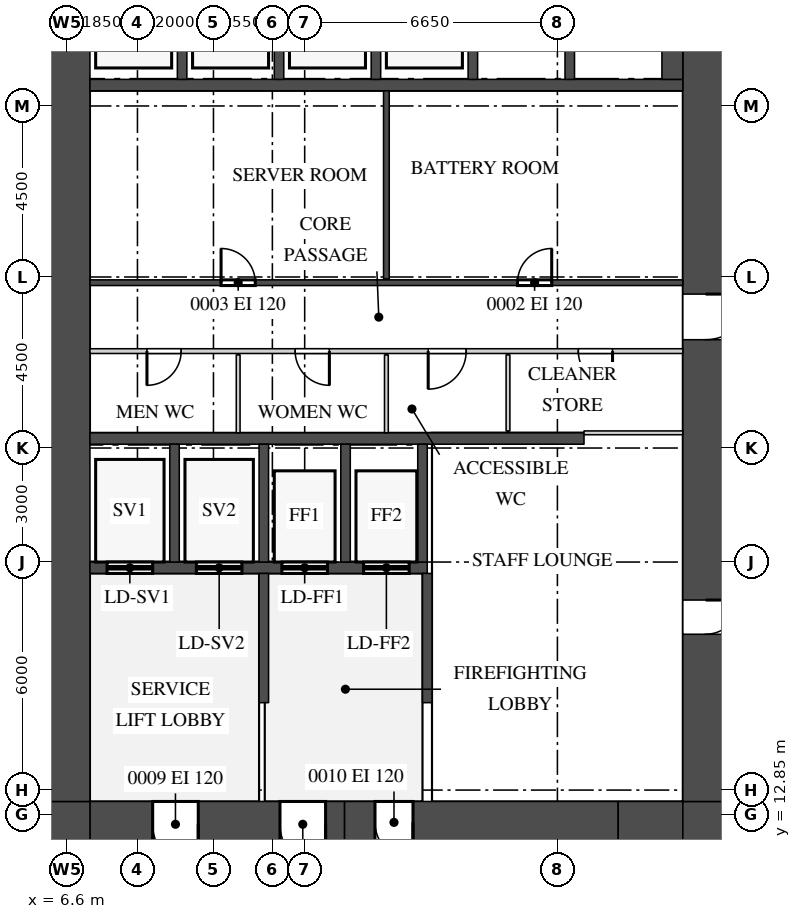
"""IFC4 building model, lengths in metres.
Left out: names, types, materials, properties, quantities, classifications, styles, units other than length and angle.
Written with IfcOpenShell. Run it as: python <this file> out.ifc"""

import sys

from ifc_helpers import new_model, si_unit, direction, frame, frame_2d, origin, place, context, subcontext, project, spatial, rectangle, extrude, source, transform, mapped, element, fill, save


model = new_model("IFC4")
c1 = context("Model", 3, precision=1e-05, world=origin(), true_north=direction((0.0, 1.0)))
c2 = subcontext(c1, "Body", "Model", "MODEL_VIEW")
j1 = project(units=[si_unit("LENGTHUNIT", "METRE"), si_unit("PLANEANGLEUNIT", "RADIAN")], contexts=[c1])
p1 = place(None, origin())
s1 = spatial("IfcSite", under=j1, at=p1, CompositionType="ELEMENT")
p2 = place(p1, origin())
s2 = spatial("IfcBuilding", under=s1, at=p2, CompositionType="ELEMENT")
p3 = place(p2, frame((0.0, 0.0, 60.0)))
s3 = spatial("IfcBuildingStorey", under=s2, at=p3, CompositionType="ELEMENT", Elevation=60.0)
m1 = source(origin(), c2, "Body", "SweptSolid", [
    extrude(rectangle(XDim=6.7, YDim=1.2, at=frame_2d((3.35, 0.0))), origin(), (0.0, 0.0, 1.0), 4.2),
])
p4 = place(p3, frame((7.2, 12.6, 0.0), z_axis=(0.0, 0.0, 1.0), x_axis=(1.0, 0.0, 0.0)))
e1 = element("IfcWall", 1, at=p4, inside=s3, PredefinedType="SHEAR", context=c2, shape_type="MappedRepresentation", body=[
    mapped(m1, transform((0.0, 0.0, 0.0))),
])
m2 = source(origin(), c2, "Body", "SweptSolid", [
    extrude(rectangle(XDim=1.2, YDim=2.1, at=frame_2d((0.6, 1.05))), frame((0.0, 0.61, 0.0), z_axis=(0.0, -1.0, 0.0), x_axis=(1.0, 0.0, 0.0)), (0.0, 0.0, 1.0), 1.22),
])
p5 = place(p4, frame((5.0, 0.0, 0.0)))
e2 = element("IfcOpeningElement", 2, at=p5, cuts=e1, PredefinedType="OPENING", context=c2, shape_type="MappedRepresentation", body=[
    mapped(m2, transform((0.0, 0.0, 0.0))),
])
p6 = place(p4, frame((1.65, 0.0, 0.0)))
e3 = element("IfcOpeningElement", 3, at=p6, cuts=e1, PredefinedType="OPENING", context=c2, shape_type="MappedRepresentation", body=[
    mapped(m2, transform((0.0, 0.0, 0.0))),
])
m3 = source(origin(), c2, "Body", "SweptSolid", [
    extrude(rectangle(XDim=7.2, YDim=1.1, at=frame_2d((3.6, 0.0))), origin(), (0.0, 0.0, 1.0), 4.2),
])
p7 = place(p3, frame((13.9, 12.65, 0.0), z_axis=(0.0, 0.0, 1.0), x_axis=(1.0, 0.0, 0.0)))
e4 = element("IfcWall", 4, at=p7, inside=s3, PredefinedType="SHEAR", context=c2, shape_type="MappedRepresentation", body=[
    mapped(m3, transform((0.0, 0.0, 0.0))),
])
m4 = source(origin(), c2, "Body", "SweptSolid", [
    extrude(rectangle(XDim=1.0, YDim=2.1, at=frame_2d((0.5, 1.05))), frame((0.0, 0.56, 0.0), z_axis=(0.0, -1.0, 0.0), x_axis=(1.0, 0.0, 0.0)), (0.0, 0.0, 1.0), 1.12),
])
p8 = place(p7, frame((0.8, 0.0, 0.0)))
e5 = element("IfcOpeningElement", 5, at=p8, cuts=e4, PredefinedType="OPENING", context=c2, shape_type="MappedRepresentation", body=[
    mapped(m4, transform((0.0, 0.0, 0.0))),
])
m5 = source(origin(), c2, "Body", "SweptSolid", [
    extrude(rectangle(XDim=1.7, YDim=1.2, at=frame_2d((0.85, 0.0))), origin(), (0.0, 0.0, 1.0), 4.2),
])
p9 = place(p3, frame((21.1, 12.6, 0.0), z_axis=(0.0, 0.0, 1.0), x_axis=(1.0, 0.0, 0.0)))
e6 = element("IfcWall", 6, at=p9, inside=s3, PredefinedType="SHEAR", context=c2, shape_type="MappedRepresentation", body=[
    mapped(m5, transform((0.0, 0.0, 0.0))),
])
m6 = source(origin(), c2, "Body", "SweptSolid", [
    extrude(rectangle(XDim=1.2, YDim=1.2, at=frame_2d((0.6, 0.0))), origin(), (0.0, 0.0, 1.0), 4.2),
])
for number, where, z_axis, x_axis in (
    (7, (22.8, 12.6, 0.0), (0.0, 0.0, 1.0), (1.0, 0.0, 0.0)),
    (8, (6.0, 12.6, 0.0), (0.0, 0.0, 1.0), (1.0, 0.0, 0.0)),
):
    element("IfcWall", number, at=place(p3, frame(where, z_axis=z_axis, x_axis=x_axis)), inside=s3, PredefinedType="SHEAR", context=c2, shape_type="MappedRepresentation", body=[
        mapped(m6, transform((0.0, 0.0, 0.0))),
    ])
m7 = source(origin(), c2, "Body", "SweptSolid", [
    extrude(rectangle(XDim=27.6, YDim=1.2, at=frame_2d((13.8, 0.0))), origin(), (0.0, 0.0, 1.0), 4.2),
])
p10 = place(p3, frame((23.4, 13.2, 0.0), z_axis=(0.0, 0.0, 1.0), x_axis=(0.0, 1.0, 0.0)))
e9 = element("IfcWall", 9, at=p10, inside=s3, PredefinedType="SHEAR", context=c2, shape_type="MappedRepresentation", body=[
    mapped(m7, transform((0.0, 0.0, 0.0))),
])
m8 = source(origin(), c2, "Body", "SweptSolid", [
    extrude(rectangle(XDim=1.8, YDim=2.1, at=frame_2d((0.9, 1.05))), frame((0.0, 0.61, 0.0), z_axis=(0.0, -1.0, 0.0), x_axis=(1.0, 0.0, 0.0)), (0.0, 0.0, 1.0), 1.22),
])
p11 = place(p10, frame((22.4, 0.0, 0.0)))
e10 = element("IfcOpeningElement", 10, at=p11, cuts=e9, PredefinedType="OPENING", context=c2, shape_type="MappedRepresentation", body=[
    mapped(m8, transform((0.0, 0.0, 0.0))),
])
p12 = place(p10, frame((12.15, 0.0, 0.0)))
e11 = element("IfcOpeningElement", 11, at=p12, cuts=e9, PredefinedType="OPENING", context=c2, shape_type="MappedRepresentation", body=[
    mapped(m2, transform((0.0, 0.0, 0.0))),
])
m9 = source(origin(), c2, "Body", "SweptSolid", [
    extrude(rectangle(XDim=0.9, YDim=2.1, at=frame_2d((0.45, 1.05))), frame((0.0, 0.61, 0.0), z_axis=(0.0, -1.0, 0.0), x_axis=(1.0, 0.0, 0.0)), (0.0, 0.0, 1.0), 1.22),
])
p13 = place(p10, frame((4.4, 0.0, 0.0)))
e12 = element("IfcOpeningElement", 12, at=p13, cuts=e9, PredefinedType="OPENING", context=c2, shape_type="MappedRepresentation", body=[
    mapped(m9, transform((0.0, 0.0, 0.0))),
])
p14 = place(p3, frame((6.6, 13.2, 0.0), z_axis=(0.0, 0.0, 1.0), x_axis=(0.0, 1.0, 0.0)))
e13 = element("IfcWall", 13, at=p14, inside=s3, PredefinedType="SHEAR", context=c2, shape_type="MappedRepresentation", body=[
    mapped(m7, transform((0.0, 0.0, 0.0))),
])
m10 = source(origin(), c2, "Body", "SweptSolid", [
    extrude(rectangle(XDim=13.0, YDim=0.3, at=frame_2d((6.5, 0.0))), origin(), (0.0, 0.0, 1.0), 4.2),
])
p15 = place(p3, frame((7.2, 22.75, 0.0), z_axis=(0.0, 0.0, 1.0), x_axis=(1.0, 0.0, 0.0)))
e14 = element("IfcWall", 14, at=p15, inside=s3, PredefinedType="STANDARD", context=c2, shape_type="MappedRepresentation", body=[
    mapped(m10, transform((0.0, 0.0, 0.0))),
])
m11 = source(origin(), c2, "Body", "SweptSolid", [
    extrude(rectangle(XDim=8.875, YDim=0.3, at=frame_2d((4.438, 0.0))), origin(), (0.0, 0.0, 1.0), 4.2),
])
p16 = place(p3, frame((7.2, 19.35, 0.0), z_axis=(0.0, 0.0, 1.0), x_axis=(1.0, 0.0, 0.0)))
e15 = element("IfcWall", 15, at=p16, inside=s3, PredefinedType="STANDARD", context=c2, shape_type="MappedRepresentation", body=[
    mapped(m11, transform((0.0, 0.0, 0.0))),
])
m12 = source(origin(), c2, "Body", "SweptSolid", [
    extrude(rectangle(XDim=1.2, YDim=2.1, at=frame_2d((0.6, 1.05))), frame((0.0, 0.16, 0.0), z_axis=(0.0, -1.0, 0.0), x_axis=(1.0, 0.0, 0.0)), (0.0, 0.0, 1.0), 0.32),
])
p17 = place(p16, frame((0.45, 0.0, 0.0)))
e16 = element("IfcOpeningElement", 16, at=p17, cuts=e15, PredefinedType="OPENING", context=c2, shape_type="MappedRepresentation", body=[
    mapped(m12, transform((0.0, 0.0, 0.0))),
])
p18 = place(p16, frame((2.8, 0.0, 0.0)))
e17 = element("IfcOpeningElement", 17, at=p18, cuts=e15, PredefinedType="OPENING", context=c2, shape_type="MappedRepresentation", body=[
    mapped(m12, transform((0.0, 0.0, 0.0))),
])
p19 = place(p16, frame((5.05, 0.0, 0.0)))
e18 = element("IfcOpeningElement", 18, at=p19, cuts=e15, PredefinedType="OPENING", context=c2, shape_type="MappedRepresentation", body=[
    mapped(m12, transform((0.0, 0.0, 0.0))),
])
p20 = place(p16, frame((7.2, 0.0, 0.0)))
e19 = element("IfcOpeningElement", 19, at=p20, cuts=e15, PredefinedType="OPENING", context=c2, shape_type="MappedRepresentation", body=[
    mapped(m12, transform((0.0, 0.0, 0.0))),
])
m13 = source(origin(), c2, "Body", "SweptSolid", [
    extrude(rectangle(XDim=15.6, YDim=0.3, at=frame_2d((7.8, 0.0))), origin(), (0.0, 0.0, 1.0), 4.2),
])
p21 = place(p3, frame((7.2, 32.05, 0.0), z_axis=(0.0, 0.0, 1.0), x_axis=(1.0, 0.0, 0.0)))
e20 = element("IfcWall", 20, at=p21, inside=s3, PredefinedType="STANDARD", context=c2, shape_type="MappedRepresentation", body=[
    mapped(m13, transform((0.0, 0.0, 0.0))),
])
m14 = source(origin(), c2, "Body", "SweptSolid", [
    extrude(rectangle(XDim=3.1, YDim=0.25, at=frame_2d((1.55, 0.0))), origin(), (0.0, 0.0, 1.0), 4.2),
])
for number, where, z_axis, x_axis in (
    (21, (9.425, 19.5, 0.0), (0.0, 0.0, 1.0), (0.0, 1.0, 0.0)),
    (22, (11.775, 19.5, 0.0), (0.0, 0.0, 1.0), (0.0, 1.0, 0.0)),
    (23, (13.925, 19.5, 0.0), (0.0, 0.0, 1.0), (0.0, 1.0, 0.0)),
    (24, (15.95, 19.5, 0.0), (0.0, 0.0, 1.0), (0.0, 1.0, 0.0)),
):
    element("IfcWall", number, at=place(p3, frame(where, z_axis=z_axis, x_axis=x_axis)), inside=s3, PredefinedType="STANDARD", context=c2, shape_type="MappedRepresentation", body=[
        mapped(m14, transform((0.0, 0.0, 0.0))),
    ])
m15 = source(origin(), c2, "Body", "SweptSolid", [
    extrude(rectangle(XDim=2.4, YDim=0.25, at=frame_2d((1.2, 0.0))), origin(), (0.0, 0.0, 1.0), 4.2),
])
for number, where, z_axis, x_axis in (
    (25, (9.625, 32.2, 0.0), (0.0, 0.0, 1.0), (0.0, 1.0, 0.0)),
    (26, (12.175, 32.2, 0.0), (0.0, 0.0, 1.0), (0.0, 1.0, 0.0)),
    (27, (14.725, 32.2, 0.0), (0.0, 0.0, 1.0), (0.0, 1.0, 0.0)),
    (28, (17.275, 32.2, 0.0), (0.0, 0.0, 1.0), (0.0, 1.0, 0.0)),
    (29, (19.825, 32.2, 0.0), (0.0, 0.0, 1.0), (0.0, 1.0, 0.0)),
):
    element("IfcWall", number, at=place(p3, frame(where, z_axis=z_axis, x_axis=x_axis)), inside=s3, PredefinedType="STANDARD", context=c2, shape_type="MappedRepresentation", body=[
        mapped(m15, transform((0.0, 0.0, 0.0))),
    ])
m16 = source(origin(), c2, "Body", "SweptSolid", [
    extrude(rectangle(XDim=2.4, YDim=0.55, at=frame_2d((1.2, 0.0))), origin(), (0.0, 0.0, 1.0), 4.2),
])
p22 = place(p3, frame((22.525, 32.2, 0.0), z_axis=(0.0, 0.0, 1.0), x_axis=(0.0, 1.0, 0.0)))
e30 = element("IfcWall", 30, at=p22, inside=s3, PredefinedType="STANDARD", context=c2, shape_type="MappedRepresentation", body=[
    mapped(m16, transform((0.0, 0.0, 0.0))),
])
m17 = source(origin(), c2, "Body", "SweptSolid", [
    extrude(rectangle(XDim=3.4, YDim=0.25, at=frame_2d((1.7, 0.0))), origin(), (0.0, 0.0, 1.0), 4.2),
])
for number, where, z_axis, x_axis in (
    (31, (16.075, 15.8, 0.0), (0.0, 0.0, 1.0), (0.0, 1.0, 0.0)),
    (32, (11.775, 15.8, 0.0), (0.0, 0.0, 1.0), (0.0, 1.0, 0.0)),
):
    element("IfcWall", number, at=place(p3, frame(where, z_axis=z_axis, x_axis=x_axis)), inside=s3, PredefinedType="STANDARD", context=c2, shape_type="MappedRepresentation", body=[
        mapped(m17, transform((0.0, 0.0, 0.0))),
    ])
m18 = source(origin(), c2, "Body", "SweptSolid", [
    extrude(rectangle(XDim=2.05, YDim=0.1, at=frame_2d((1.025, 0.0))), origin(), (0.0, 0.0, 1.0), 4.3),
])
for number, where, z_axis, x_axis in (
    (33, (11.1, 22.9, 0.0), (0.0, 0.0, 1.0), (0.0, 1.0, 0.0)),
    (34, (15.0, 22.9, 0.0), (0.0, 0.0, 1.0), (0.0, 1.0, 0.0)),
):
    element("IfcWall", number, at=place(p3, frame(where, z_axis=z_axis, x_axis=x_axis)), inside=s3, PredefinedType="PARTITIONING", context=c2, shape_type="MappedRepresentation", body=[
        mapped(m18, transform((0.0, 0.0, 0.0))),
    ])
m19 = source(origin(), c2, "Body", "SweptSolid", [
    extrude(rectangle(XDim=2.6, YDim=0.1, at=frame_2d((1.3, 0.0))), origin(), (0.0, 0.0, 1.0), 4.3),
])
p23 = place(p3, frame((20.2, 22.9, 0.0), z_axis=(0.0, 0.0, 1.0), x_axis=(1.0, 0.0, 0.0)))
e35 = element("IfcWall", 35, at=p23, inside=s3, PredefinedType="PARTITIONING", context=c2, shape_type="MappedRepresentation", body=[
    mapped(m19, transform((0.0, 0.0, 0.0))),
])
m20 = source(origin(), c2, "Body", "SweptSolid", [
    extrude(rectangle(XDim=2.0, YDim=0.1, at=frame_2d((1.0, 0.0))), origin(), (0.0, 0.0, 1.0), 4.3),
])
p24 = place(p3, frame((18.2, 22.95, 0.0), z_axis=(0.0, 0.0, 1.0), x_axis=(0.0, 1.0, 0.0)))
e36 = element("IfcWall", 36, at=p24, inside=s3, PredefinedType="PARTITIONING", context=c2, shape_type="MappedRepresentation", body=[
    mapped(m20, transform((0.0, 0.0, 0.0))),
])
m21 = source(origin(), c2, "Body", "SweptSolid", [
    extrude(rectangle(XDim=15.6, YDim=0.125, at=frame_2d((7.8, 0.0))), origin(), (0.0, 0.0, 1.0), 4.3),
])
p25 = place(p3, frame((7.2, 25.05, 0.0), z_axis=(0.0, 0.0, 1.0), x_axis=(1.0, 0.0, 0.0)))
e37 = element("IfcWall", 37, at=p25, inside=s3, PredefinedType="PARTITIONING", context=c2, shape_type="MappedRepresentation", body=[
    mapped(m21, transform((0.0, 0.0, 0.0))),
])
m22 = source(origin(), c2, "Body", "SweptSolid", [
    extrude(rectangle(XDim=0.9, YDim=2.1, at=frame_2d((0.45, 1.05))), frame((0.0, 0.073, 0.0), z_axis=(0.0, -1.0, 0.0), x_axis=(1.0, 0.0, 0.0)), (0.0, 0.0, 1.0), 0.145),
])
p26 = place(p25, frame((1.5, 0.0, 0.0)))
e38 = element("IfcOpeningElement", 38, at=p26, cuts=e37, PredefinedType="OPENING", context=c2, shape_type="MappedRepresentation", body=[
    mapped(m22, transform((0.0, 0.0, 0.0))),
])
p27 = place(p25, frame((5.4, 0.0, 0.0)))
e39 = element("IfcOpeningElement", 39, at=p27, cuts=e37, PredefinedType="OPENING", context=c2, shape_type="MappedRepresentation", body=[
    mapped(m22, transform((0.0, 0.0, 0.0))),
])
m23 = source(origin(), c2, "Body", "SweptSolid", [
    extrude(rectangle(XDim=1.0, YDim=2.1, at=frame_2d((0.5, 1.05))), frame((0.0, 0.073, 0.0), z_axis=(0.0, -1.0, 0.0), x_axis=(1.0, 0.0, 0.0)), (0.0, 0.0, 1.0), 0.145),
])
p28 = place(p25, frame((8.9, 0.0, 0.0)))
e40 = element("IfcOpeningElement", 40, at=p28, cuts=e37, PredefinedType="OPENING", context=c2, shape_type="MappedRepresentation", body=[
    mapped(m23, transform((0.0, 0.0, 0.0))),
])
p29 = place(p25, frame((12.85, 0.0, 0.0)))
e41 = element("IfcOpeningElement", 41, at=p29, cuts=e37, PredefinedType="OPENING", context=c2, shape_type="MappedRepresentation", body=[
    mapped(m22, transform((0.0, 0.0, 0.0))),
])
m24 = source(origin(), c2, "Body", "SweptSolid", [
    extrude(rectangle(XDim=15.6, YDim=0.15, at=frame_2d((7.8, 0.0))), origin(), (0.0, 0.0, 1.0), 4.3),
])
p30 = place(p3, frame((7.2, 26.85, 0.0), z_axis=(0.0, 0.0, 1.0), x_axis=(1.0, 0.0, 0.0)))
e42 = element("IfcWall", 42, at=p30, inside=s3, PredefinedType="PARTITIONING", context=c2, shape_type="MappedRepresentation", body=[
    mapped(m24, transform((0.0, 0.0, 0.0))),
])
m25 = source(origin(), c2, "Body", "SweptSolid", [
    extrude(rectangle(XDim=0.9, YDim=2.1, at=frame_2d((0.45, 1.05))), frame((0.0, 0.085, 0.0), z_axis=(0.0, -1.0, 0.0), x_axis=(1.0, 0.0, 0.0)), (0.0, 0.0, 1.0), 0.17),
])
p31 = place(p30, frame((3.45, 0.0, 0.0)))
e43 = element("IfcOpeningElement", 43, at=p31, cuts=e42, PredefinedType="OPENING", context=c2, shape_type="MappedRepresentation", body=[
    mapped(m25, transform((0.0, 0.0, 0.0))),
])
p32 = place(p30, frame((11.25, 0.0, 0.0)))
e44 = element("IfcOpeningElement", 44, at=p32, cuts=e42, PredefinedType="OPENING", context=c2, shape_type="MappedRepresentation", body=[
    mapped(m25, transform((0.0, 0.0, 0.0))),
])
m26 = source(origin(), c2, "Body", "SweptSolid", [
    extrude(rectangle(XDim=4.95, YDim=0.15, at=frame_2d((2.475, 0.0))), origin(), (0.0, 0.0, 1.0), 4.3),
])
p33 = place(p3, frame((15.0, 26.95, 0.0), z_axis=(0.0, 0.0, 1.0), x_axis=(0.0, 1.0, 0.0)))
e45 = element("IfcWall", 45, at=p33, inside=s3, PredefinedType="PARTITIONING", context=c2, shape_type="MappedRepresentation", body=[
    mapped(m26, transform((0.0, 0.0, 0.0))),
])
m27 = source(origin(), c2, "Body", "SweptSolid", [
    extrude(rectangle(XDim=1.2, YDim=2.1, at=frame_2d((0.6, 1.05))), frame((0.0, 0.55, 0.0), z_axis=(0.0, -1.0, 0.0), x_axis=(1.0, 0.0, 0.0)), (0.0, 0.0, 1.0), 1.1),
])
p34 = place(p12, origin())
e46 = element("IfcDoor", 46, at=p34, inside=s3, OperationType="SINGLE_SWING_RIGHT", PredefinedType="DOOR", context=c2, shape_type="MappedRepresentation", body=[
    mapped(m27, transform((0.0, 0.0, 0.0))),
])
fill(e11, e46)
m28 = source(origin(), c2, "Body", "SweptSolid", [
    extrude(rectangle(XDim=0.9, YDim=2.1, at=frame_2d((0.45, 1.05))), frame((0.0, 0.025, 0.0), z_axis=(0.0, -1.0, 0.0), x_axis=(1.0, 0.0, 0.0)), (0.0, 0.0, 1.0), 0.05),
])
p35 = place(p31, origin())
e47 = element("IfcDoor", 47, at=p35, inside=s3, OperationType="SINGLE_SWING_RIGHT", PredefinedType="DOOR", context=c2, shape_type="MappedRepresentation", body=[
    mapped(m28, transform((0.0, 0.0, 0.0))),
])
fill(e43, e47)
p36 = place(p32, origin())
e48 = element("IfcDoor", 48, at=p36, inside=s3, OperationType="SINGLE_SWING_LEFT", PredefinedType="DOOR", context=c2, shape_type="MappedRepresentation", body=[
    mapped(m28, transform((0.0, 0.0, 0.0))),
])
fill(e44, e48)
p37 = place(p26, origin())
e49 = element("IfcDoor", 49, at=p37, inside=s3, OperationType="SINGLE_SWING_LEFT", PredefinedType="DOOR", context=c2, shape_type="MappedRepresentation", body=[
    mapped(m28, transform((0.0, 0.0, 0.0))),
])
fill(e38, e49)
p38 = place(p27, origin())
e50 = element("IfcDoor", 50, at=p38, inside=s3, OperationType="SINGLE_SWING_RIGHT", PredefinedType="DOOR", context=c2, shape_type="MappedRepresentation", body=[
    mapped(m28, transform((0.0, 0.0, 0.0))),
])
fill(e39, e50)
m29 = source(origin(), c2, "Body", "SweptSolid", [
    extrude(rectangle(XDim=1.0, YDim=2.1, at=frame_2d((0.5, 1.05))), frame((0.0, 0.025, 0.0), z_axis=(0.0, -1.0, 0.0), x_axis=(1.0, 0.0, 0.0)), (0.0, 0.0, 1.0), 0.05),
])
p39 = place(p28, origin())
e51 = element("IfcDoor", 51, at=p39, inside=s3, OperationType="SINGLE_SWING_LEFT", PredefinedType="DOOR", context=c2, shape_type="MappedRepresentation", body=[
    mapped(m29, transform((0.0, 0.0, 0.0))),
])
fill(e40, e51)
p40 = place(p29, origin())
e52 = element("IfcDoor", 52, at=p40, inside=s3, OperationType="SINGLE_SWING_RIGHT", PredefinedType="DOOR", context=c2, shape_type="MappedRepresentation", body=[
    mapped(m28, transform((0.0, 0.0, 0.0))),
])
fill(e41, e52)
m30 = source(origin(), c2, "Body", "SweptSolid", [
    extrude(rectangle(XDim=0.9, YDim=2.1, at=frame_2d((0.45, 1.05))), frame((0.0, 0.55, 0.0), z_axis=(0.0, -1.0, 0.0), x_axis=(1.0, 0.0, 0.0)), (0.0, 0.0, 1.0), 1.1),
])
p41 = place(p13, origin())
e53 = element("IfcDoor", 53, at=p41, inside=s3, OperationType="SINGLE_SWING_RIGHT", PredefinedType="DOOR", context=c2, shape_type="MappedRepresentation", body=[
    mapped(m30, transform((0.0, 0.0, 0.0))),
])
fill(e12, e53)
p42 = place(p5, origin())
e54 = element("IfcDoor", 54, at=p42, inside=s3, OperationType="SINGLE_SWING_RIGHT", PredefinedType="DOOR", context=c2, shape_type="MappedRepresentation", body=[
    mapped(m27, transform((0.0, 0.0, 0.0))),
])
fill(e2, e54)
p43 = place(p6, origin())
e55 = element("IfcDoor", 55, at=p43, inside=s3, OperationType="SINGLE_SWING_RIGHT", PredefinedType="DOOR", context=c2, shape_type="MappedRepresentation", body=[
    mapped(m27, transform((0.0, 0.0, 0.0))),
])
fill(e3, e55)
m31 = source(origin(), c2, "Body", "SweptSolid", [
    extrude(rectangle(XDim=1.0, YDim=2.1, at=frame_2d((0.5, 1.05))), frame((0.0, 0.5, 0.0), z_axis=(0.0, -1.0, 0.0), x_axis=(1.0, 0.0, 0.0)), (0.0, 0.0, 1.0), 1.0),
])
p44 = place(p8, origin())
e56 = element("IfcDoor", 56, at=p44, inside=s3, OperationType="SINGLE_SWING_RIGHT", PredefinedType="DOOR", context=c2, shape_type="MappedRepresentation", body=[
    mapped(m31, transform((0.0, 0.0, 0.0))),
])
fill(e5, e56)
m32 = source(origin(), c2, "Body", "SweptSolid", [
    extrude(rectangle(XDim=1.2, YDim=2.1, at=frame_2d((0.6, 1.05))), frame((0.0, 0.025, 0.0), z_axis=(0.0, -1.0, 0.0), x_axis=(1.0, 0.0, 0.0)), (0.0, 0.0, 1.0), 0.05),
])
p45 = place(p17, origin())
e57 = element("IfcDoor", 57, at=p45, inside=s3, OperationType="DOUBLE_DOOR_SLIDING", PredefinedType="DOOR", context=c2, shape_type="MappedRepresentation", body=[
    mapped(m32, transform((0.0, 0.0, 0.0))),
])
fill(e16, e57)
p46 = place(p18, origin())
e58 = element("IfcDoor", 58, at=p46, inside=s3, OperationType="DOUBLE_DOOR_SLIDING", PredefinedType="DOOR", context=c2, shape_type="MappedRepresentation", body=[
    mapped(m32, transform((0.0, 0.0, 0.0))),
])
fill(e17, e58)
p47 = place(p19, origin())
e59 = element("IfcDoor", 59, at=p47, inside=s3, OperationType="DOUBLE_DOOR_SLIDING", PredefinedType="DOOR", context=c2, shape_type="MappedRepresentation", body=[
    mapped(m32, transform((0.0, 0.0, 0.0))),
])
fill(e18, e59)
p48 = place(p20, origin())
e60 = element("IfcDoor", 60, at=p48, inside=s3, OperationType="DOUBLE_DOOR_SLIDING", PredefinedType="DOOR", context=c2, shape_type="MappedRepresentation", body=[
    mapped(m32, transform((0.0, 0.0, 0.0))),
])
fill(e19, e60)
save(model, sys.argv[1])
